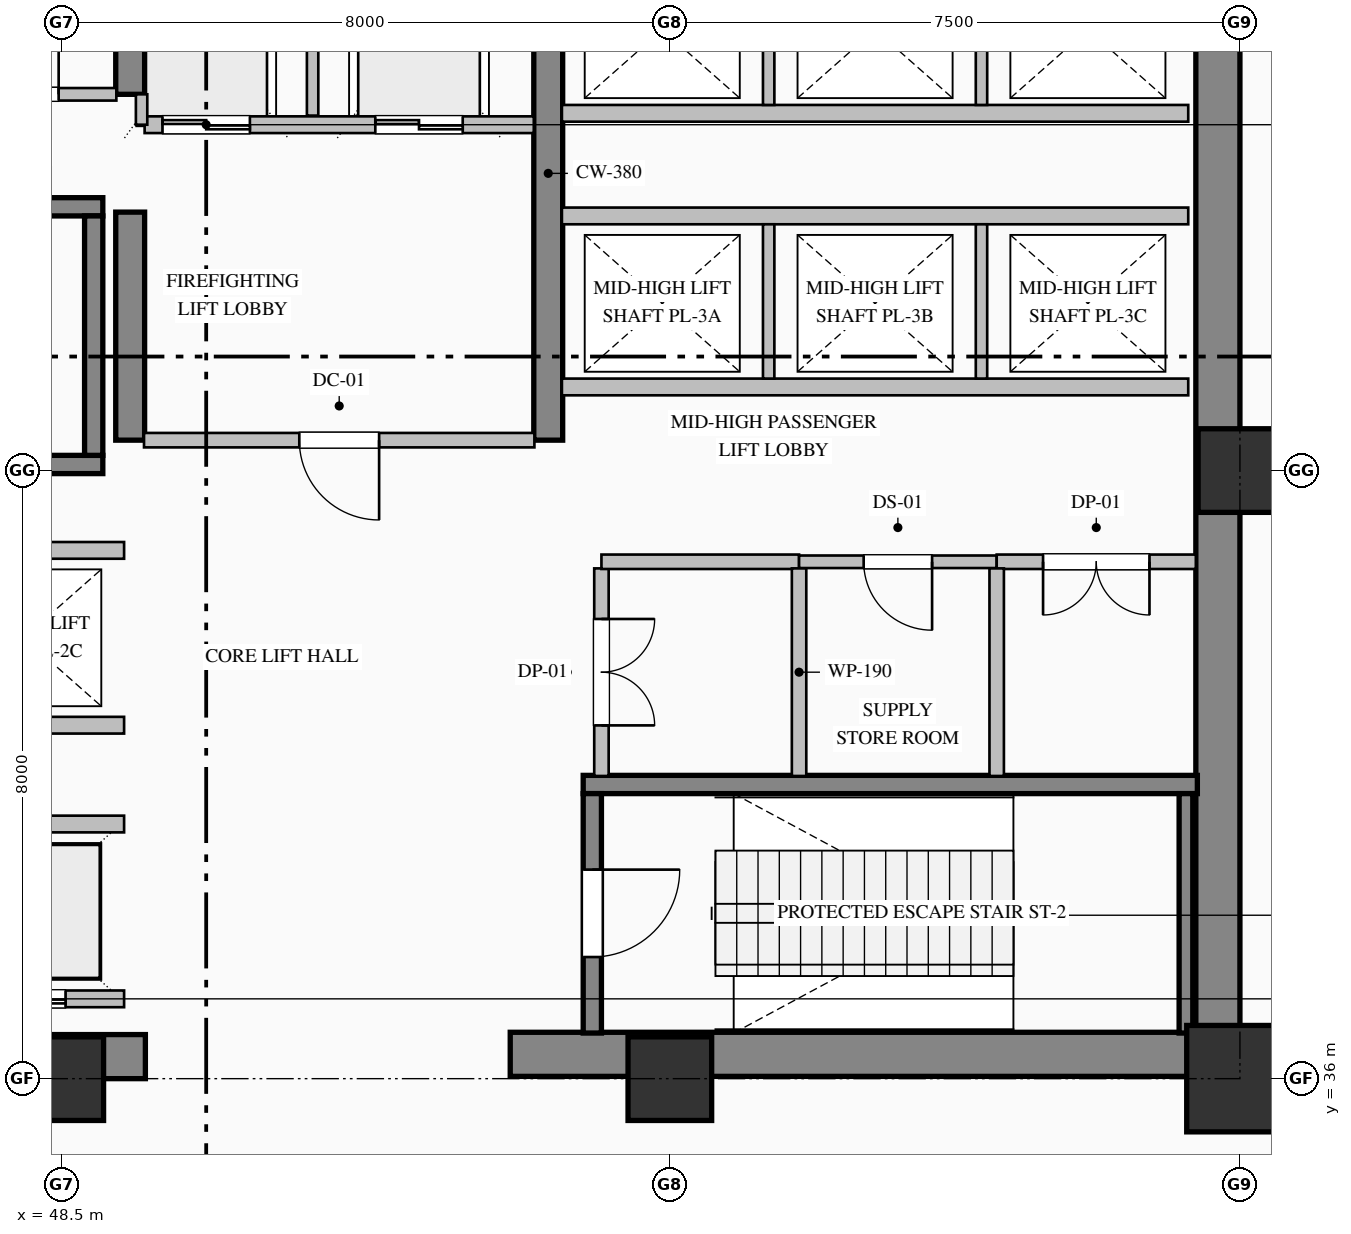
"""IFC4 building model, lengths in metres.
Left out: names, types, materials, properties, quantities, classifications, styles, units other than length and angle.
Written with IfcOpenShell. Run it as: python <this file> out.ifc"""

import sys

from ifc_helpers import new_model, si_unit, direction, frame, frame_2d, origin, origin_2d, place, context, subcontext, project, spatial, rectangle, hollow_rectangle, extrude, element, fill, save


model = new_model("IFC4")
c1 = context("Model", 3, precision=1e-05, world=origin(), true_north=direction((0.0, 1.0)))
c2 = subcontext(c1, "Body", "Model", "MODEL_VIEW")
j1 = project(units=[si_unit("LENGTHUNIT", "METRE"), si_unit("PLANEANGLEUNIT", "RADIAN")], contexts=[c1])
p1 = place(None, origin())
s1 = spatial("IfcSite", under=j1, at=p1, CompositionType="ELEMENT")
p2 = place(p1, origin())
s2 = spatial("IfcBuilding", under=s1, at=p2, CompositionType="ELEMENT")
p3 = place(p2, frame((0.0, 0.0, 6.0)))
s3 = spatial("IfcBuildingStorey", under=s2, at=p3, CompositionType="ELEMENT", Elevation=6.0)
p4 = place(p3, frame((63.71, 36.32, 0.0), z_axis=(0.0, 0.0, 1.0), x_axis=(0.0, 1.0, 0.0)))
e1 = element("IfcWall", 1, at=p4, inside=s3, PredefinedType="SHEAR", context=c2, shape_type="SweptSolid", body=[
    extrude(rectangle(XDim=15.1, YDim=0.58, at=frame_2d((7.55, 0.0))), origin(), (0.0, 0.0, 1.0), 5.12),
])
p5 = place(p3, frame((48.2, 36.29, 0.0), z_axis=(0.0, 0.0, 1.0), x_axis=(1.0, 0.0, 0.0)))
e2 = element("IfcWall", 2, at=p5, inside=s3, PredefinedType="SHEAR", context=c2, shape_type="SweptSolid", body=[
    extrude(rectangle(XDim=1.4, YDim=0.58, at=frame_2d((0.7, 0.0))), origin(), (0.0, 0.0, 1.0), 5.12),
])
p6 = place(p3, frame((54.4, 36.32, 0.0), z_axis=(0.0, 0.0, 1.0), x_axis=(1.0, 0.0, 0.0)))
e3 = element("IfcWall", 3, at=p6, inside=s3, PredefinedType="SHEAR", context=c2, shape_type="SweptSolid", body=[
    extrude(rectangle(XDim=9.6, YDim=0.58, at=frame_2d((4.8, 0.0))), origin(), (0.0, 0.0, 1.0), 5.4),
])
p7 = place(p3, frame((49.4, 44.4, 0.0), z_axis=(0.0, 0.0, 1.0), x_axis=(0.0, 1.0, 0.0)))
e4 = element("IfcWall", 4, at=p7, inside=s3, PredefinedType="SHEAR", context=c2, shape_type="SweptSolid", body=[
    extrude(rectangle(XDim=3.0, YDim=0.38, at=frame_2d((1.5, 0.0))), origin(), (0.0, 0.0, 1.0), 5.12),
])
p8 = place(p3, frame((49.4, 48.95, 0.0), z_axis=(0.0, 0.0, 1.0), x_axis=(0.0, 1.0, 0.0)))
e5 = element("IfcWall", 5, at=p8, inside=s3, PredefinedType="SHEAR", context=c2, shape_type="SweptSolid", body=[
    extrude(rectangle(XDim=2.47, YDim=0.38, at=frame_2d((1.235, 0.0))), origin(), (0.0, 0.0, 1.0), 5.12),
])
p9 = place(p3, frame((54.9, 44.4, 0.0), z_axis=(0.0, 0.0, 1.0), x_axis=(0.0, 1.0, 0.0)))
e6 = element("IfcWall", 6, at=p9, inside=s3, PredefinedType="SHEAR", context=c2, shape_type="SweptSolid", body=[
    extrude(rectangle(XDim=7.02, YDim=0.38, at=frame_2d((3.51, 0.0))), origin(), (0.0, 0.0, 1.0), 5.12),
])
for number, where, z_axis, x_axis in (
    (7, (48.5, 36.0, 0.0), (0.0, 0.0, 1.0), (1.0, 0.0, 0.0)),
    (8, (56.5, 36.0, 0.0), (0.0, 0.0, 1.0), (1.0, 0.0, 0.0)),
):
    element("IfcColumn", number, at=place(p3, frame(where, z_axis=z_axis, x_axis=x_axis)), inside=s3, PredefinedType="COLUMN", context=c2, shape_type="SweptSolid", body=[
        extrude(rectangle(XDim=1.1, YDim=1.1, at=origin_2d()), origin(), (0.0, 0.0, 1.0), 5.4),
    ])
p10 = place(p3, frame((64.0, 36.0, 0.0), z_axis=(0.0, 0.0, 1.0), x_axis=(1.0, 0.0, 0.0)))
e9 = element("IfcColumn", 9, at=p10, inside=s3, PredefinedType="COLUMN", context=c2, shape_type="SweptSolid", body=[
    extrude(hollow_rectangle(XDim=1.4, YDim=1.4, WallThickness=0.05, at=origin_2d()), origin(), (0.0, 0.0, 1.0), 5.4),
])
p11 = place(p3, frame((64.0, 44.0, 0.0), z_axis=(0.0, 0.0, 1.0), x_axis=(1.0, 0.0, 0.0)))
e10 = element("IfcColumn", 10, at=p11, inside=s3, PredefinedType="COLUMN", context=c2, shape_type="SweptSolid", body=[
    extrude(rectangle(XDim=1.1, YDim=1.1, at=origin_2d()), origin(), (0.0, 0.0, 1.0), 5.4),
])
for number, where, z_axis, x_axis in (
    (11, (40.96, 47.47, 0.0), (0.0, 0.0, 1.0), (1.0, 0.0, 0.0)),
    (12, (49.04, 44.08, 0.0), (0.0, 0.0, 1.0), (-1.0, 0.0, 0.0)),
):
    element("IfcWall", number, at=place(p3, frame(where, z_axis=z_axis, x_axis=x_axis)), inside=s3, PredefinedType="SOLIDWALL", context=c2, shape_type="SweptSolid", body=[
        extrude(rectangle(XDim=8.08, YDim=0.24, at=frame_2d((4.04, 0.0))), origin(), (0.0, 0.0, 1.0), 5.4),
    ])
p12 = place(p3, frame((48.92, 44.2, 0.0), z_axis=(0.0, 0.0, 1.0), x_axis=(0.0, 1.0, 0.0)))
e13 = element("IfcWall", 13, at=p12, inside=s3, PredefinedType="SOLIDWALL", context=c2, shape_type="SweptSolid", body=[
    extrude(rectangle(XDim=3.15, YDim=0.24, at=frame_2d((1.575, 0.0))), origin(), (0.0, 0.0, 1.0), 5.4),
])
p13 = place(p3, frame((55.36, 39.87, 0.0), z_axis=(0.0, 0.0, 1.0), x_axis=(1.0, 0.0, 0.0)))
e14 = element("IfcWall", 14, at=p13, inside=s3, PredefinedType="SOLIDWALL", context=c2, shape_type="SweptSolid", body=[
    extrude(rectangle(XDim=8.08, YDim=0.24, at=frame_2d((4.04, 0.0))), origin(), (0.0, 0.0, 1.0), 5.4),
])
p14 = place(p3, frame((55.48, 39.75, 0.0), z_axis=(0.0, 0.0, 1.0), x_axis=(0.0, -1.0, 0.0)))
e15 = element("IfcWall", 15, at=p14, inside=s3, PredefinedType="SOLIDWALL", context=c2, shape_type="SweptSolid", body=[
    extrude(rectangle(XDim=3.15, YDim=0.24, at=frame_2d((1.575, 0.0))), origin(), (0.0, 0.0, 1.0), 5.4),
])
p15 = place(p14, frame((1.0, 0.0, 0.0)))
e16 = element("IfcOpeningElement", 16, at=p15, cuts=e15, PredefinedType="OPENING", context=c2, shape_type="SweptSolid", body=[
    extrude(rectangle(XDim=1.15, YDim=2.2, at=frame_2d((0.575, 1.1))), frame((0.0, 0.13, 0.0), z_axis=(0.0, -1.0, 0.0), x_axis=(1.0, 0.0, 0.0)), (0.0, 0.0, 1.0), 0.26),
])
p16 = place(p3, frame((63.29, 36.6, 0.0), z_axis=(0.0, 0.0, 1.0), x_axis=(0.0, 1.0, 0.0)))
e17 = element("IfcWall", 17, at=p16, inside=s3, PredefinedType="SOLIDWALL", context=c2, shape_type="SweptSolid", body=[
    extrude(rectangle(XDim=3.15, YDim=0.18, at=frame_2d((1.575, 0.0))), origin(), (0.0, 0.0, 1.0), 5.4),
])
p17 = place(p3, frame((54.71, 48.55, 0.0), z_axis=(0.0, 0.0, 1.0), x_axis=(-1.0, 0.0, 0.0)))
e18 = element("IfcWall", 18, at=p17, inside=s3, PredefinedType="PARTITIONING", context=c2, shape_type="SweptSolid", body=[
    extrude(rectangle(XDim=5.12, YDim=0.22, at=frame_2d((2.56, 0.0))), origin(), (0.0, 0.0, 1.0), 5.12),
])
p18 = place(p17, frame((3.735, 0.0, 0.0)))
e19 = element("IfcOpeningElement", 19, at=p18, cuts=e18, PredefinedType="OPENING", context=c2, shape_type="SweptSolid", body=[
    extrude(rectangle(XDim=1.15, YDim=2.2, at=frame_2d((0.575, 1.1))), frame((0.0, 0.12, 0.0), z_axis=(0.0, -1.0, 0.0), x_axis=(1.0, 0.0, 0.0)), (0.0, 0.0, 1.0), 0.24),
])
p19 = place(p17, frame((0.935, 0.0, 0.0)))
e20 = element("IfcOpeningElement", 20, at=p19, cuts=e18, PredefinedType="OPENING", context=c2, shape_type="SweptSolid", body=[
    extrude(rectangle(XDim=1.15, YDim=2.2, at=frame_2d((0.575, 1.1))), frame((0.0, 0.12, 0.0), z_axis=(0.0, -1.0, 0.0), x_axis=(1.0, 0.0, 0.0)), (0.0, 0.0, 1.0), 0.24),
])
p20 = place(p3, frame((51.8, 48.67, 0.0), z_axis=(0.0, 0.0, 1.0), x_axis=(0.0, 1.0, 0.0)))
e21 = element("IfcWall", 21, at=p20, inside=s3, PredefinedType="PARTITIONING", context=c2, shape_type="SweptSolid", body=[
    extrude(rectangle(XDim=2.75, YDim=0.15, at=frame_2d((1.375, 0.0))), origin(), (0.0, 0.0, 1.0), 5.12),
])
p21 = place(p3, frame((49.55, 48.55, 0.0), z_axis=(0.0, 0.0, 1.0), x_axis=(0.0, 1.0, 0.0)))
e22 = element("IfcWall", 22, at=p21, inside=s3, PredefinedType="PARTITIONING", context=c2, shape_type="SweptSolid", body=[
    extrude(rectangle(XDim=0.4, YDim=0.15, at=frame_2d((0.2, 0.0))), origin(), (0.0, 0.0, 1.0), 5.12),
])
p22 = place(p3, frame((49.32, 37.05, 0.0), z_axis=(0.0, 0.0, 1.0), x_axis=(-1.0, 0.0, 0.0)))
e23 = element("IfcWall", 23, at=p22, inside=s3, PredefinedType="PARTITIONING", context=c2, shape_type="SweptSolid", body=[
    extrude(rectangle(XDim=8.24, YDim=0.22, at=frame_2d((4.12, 0.0))), origin(), (0.0, 0.0, 1.0), 5.12),
])
p23 = place(p22, frame((6.37, 0.0, 0.0)))
e24 = element("IfcOpeningElement", 24, at=p23, cuts=e23, PredefinedType="OPENING", context=c2, shape_type="SweptSolid", body=[
    extrude(rectangle(XDim=1.1, YDim=2.2, at=frame_2d((0.55, 1.1))), frame((0.0, 0.12, 0.0), z_axis=(0.0, -1.0, 0.0), x_axis=(1.0, 0.0, 0.0)), (0.0, 0.0, 1.0), 0.24),
])
p24 = place(p22, frame((3.57, 0.0, 0.0)))
e25 = element("IfcOpeningElement", 25, at=p24, cuts=e23, PredefinedType="OPENING", context=c2, shape_type="SweptSolid", body=[
    extrude(rectangle(XDim=1.1, YDim=2.2, at=frame_2d((0.55, 1.1))), frame((0.0, 0.12, 0.0), z_axis=(0.0, -1.0, 0.0), x_axis=(1.0, 0.0, 0.0)), (0.0, 0.0, 1.0), 0.24),
])
p25 = place(p22, frame((0.77, 0.0, 0.0)))
e26 = element("IfcOpeningElement", 26, at=p25, cuts=e23, PredefinedType="OPENING", context=c2, shape_type="SweptSolid", body=[
    extrude(rectangle(XDim=1.1, YDim=2.2, at=frame_2d((0.55, 1.1))), frame((0.0, 0.12, 0.0), z_axis=(0.0, -1.0, 0.0), x_axis=(1.0, 0.0, 0.0)), (0.0, 0.0, 1.0), 0.24),
])
for number, where, z_axis, x_axis in (
    (27, (41.08, 39.35, 0.0), (0.0, 0.0, 1.0), (1.0, 0.0, 0.0)),
    (28, (49.32, 40.65, 0.0), (0.0, 0.0, 1.0), (-1.0, 0.0, 0.0)),
    (29, (41.08, 42.95, 0.0), (0.0, 0.0, 1.0), (1.0, 0.0, 0.0)),
    (30, (63.32, 45.1, 0.0), (0.0, 0.0, 1.0), (-1.0, 0.0, 0.0)),
    (31, (55.08, 47.35, 0.0), (0.0, 0.0, 1.0), (1.0, 0.0, 0.0)),
):
    element("IfcWall", number, at=place(p3, frame(where, z_axis=z_axis, x_axis=x_axis)), inside=s3, PredefinedType="PARTITIONING", context=c2, shape_type="SweptSolid", body=[
        extrude(rectangle(XDim=8.24, YDim=0.22, at=frame_2d((4.12, 0.0))), origin(), (0.0, 0.0, 1.0), 5.12),
    ])
for number, where, z_axis, x_axis in (
    (32, (57.8, 45.21, 0.0), (0.0, 0.0, 1.0), (0.0, 1.0, 0.0)),
    (33, (60.6, 45.21, 0.0), (0.0, 0.0, 1.0), (0.0, 1.0, 0.0)),
):
    element("IfcWall", number, at=place(p3, frame(where, z_axis=z_axis, x_axis=x_axis)), inside=s3, PredefinedType="PARTITIONING", context=c2, shape_type="SweptSolid", body=[
        extrude(rectangle(XDim=2.03, YDim=0.15, at=frame_2d((1.015, 0.0))), origin(), (0.0, 0.0, 1.0), 5.12),
    ])
p26 = place(p3, frame((63.32, 48.7, 0.0), z_axis=(0.0, 0.0, 1.0), x_axis=(-1.0, 0.0, 0.0)))
e34 = element("IfcWall", 34, at=p26, inside=s3, PredefinedType="PARTITIONING", context=c2, shape_type="SweptSolid", body=[
    extrude(rectangle(XDim=8.24, YDim=0.22, at=frame_2d((4.12, 0.0))), origin(), (0.0, 0.0, 1.0), 5.12),
])
for number, where, z_axis, x_axis in (
    (35, (57.8, 48.81, 0.0), (0.0, 0.0, 1.0), (0.0, 1.0, 0.0)),
    (36, (60.6, 48.81, 0.0), (0.0, 0.0, 1.0), (0.0, 1.0, 0.0)),
):
    element("IfcWall", number, at=place(p3, frame(where, z_axis=z_axis, x_axis=x_axis)), inside=s3, PredefinedType="PARTITIONING", context=c2, shape_type="SweptSolid", body=[
        extrude(rectangle(XDim=2.61, YDim=0.15, at=frame_2d((1.305, 0.0))), origin(), (0.0, 0.0, 1.0), 5.12),
    ])
p27 = place(p3, frame((46.8, 48.95, 0.0), z_axis=(0.0, 0.0, 1.0), x_axis=(1.0, 0.0, 0.0)))
e37 = element("IfcWall", 37, at=p27, inside=s3, PredefinedType="PARTITIONING", context=c2, shape_type="SweptSolid", body=[
    extrude(rectangle(XDim=2.418, YDim=0.165, at=frame_2d((1.209, 0.0))), origin(), (0.0, 0.0, 1.0), 5.12),
])
p28 = place(p27, frame((0.759, 0.0, 0.0)))
e38 = element("IfcOpeningElement", 38, at=p28, cuts=e37, PredefinedType="OPENING", context=c2, shape_type="SweptSolid", body=[
    extrude(rectangle(XDim=0.9, YDim=2.15, at=frame_2d((0.45, 1.075))), frame((0.0, 0.093, 0.0), z_axis=(0.0, -1.0, 0.0), x_axis=(1.0, 0.0, 0.0)), (0.0, 0.0, 1.0), 0.185),
])
p29 = place(p3, frame((54.718, 44.4, 0.0), z_axis=(0.0, 0.0, 1.0), x_axis=(-1.0, 0.0, 0.0)))
e39 = element("IfcWall", 39, at=p29, inside=s3, PredefinedType="PARTITIONING", context=c2, shape_type="SweptSolid", body=[
    extrude(rectangle(XDim=5.136, YDim=0.19, at=frame_2d((2.568, 0.0))), origin(), (0.0, 0.0, 1.0), 5.12),
])
p30 = place(p29, frame((2.043, 0.0, 0.0)))
e40 = element("IfcOpeningElement", 40, at=p30, cuts=e39, PredefinedType="OPENING", context=c2, shape_type="SweptSolid", body=[
    extrude(rectangle(XDim=1.05, YDim=2.15, at=frame_2d((0.525, 1.075))), frame((0.0, 0.105, 0.0), z_axis=(0.0, -1.0, 0.0), x_axis=(1.0, 0.0, 0.0)), (0.0, 0.0, 1.0), 0.21),
])
p31 = place(p3, frame((55.6, 42.713, 0.0), z_axis=(0.0, 0.0, 1.0), x_axis=(0.0, -1.0, 0.0)))
e41 = element("IfcWall", 41, at=p31, inside=s3, PredefinedType="PARTITIONING", context=c2, shape_type="SweptSolid", body=[
    extrude(rectangle(XDim=2.731, YDim=0.19, at=frame_2d((1.365, 0.0))), origin(), (0.0, 0.0, 1.0), 5.12),
])
p32 = place(p31, frame((0.666, 0.0, 0.0)))
e42 = element("IfcOpeningElement", 42, at=p32, cuts=e41, PredefinedType="OPENING", context=c2, shape_type="SweptSolid", body=[
    extrude(rectangle(XDim=1.4, YDim=2.25, at=frame_2d((0.7, 1.125))), frame((0.0, 0.105, 0.0), z_axis=(0.0, -1.0, 0.0), x_axis=(1.0, 0.0, 0.0)), (0.0, 0.0, 1.0), 0.21),
])
p33 = place(p3, frame((58.2, 42.8, 0.0), z_axis=(0.0, 0.0, 1.0), x_axis=(-1.0, 0.0, 0.0)))
e43 = element("IfcWall", 43, at=p33, inside=s3, PredefinedType="PARTITIONING", context=c2, shape_type="SweptSolid", body=[
    extrude(rectangle(XDim=2.6, YDim=0.19, at=frame_2d((1.3, 0.0))), origin(), (0.0, 0.0, 1.0), 5.12),
])
p34 = place(p3, frame((60.8, 42.8, 0.0), z_axis=(0.0, 0.0, 1.0), x_axis=(-1.0, 0.0, 0.0)))
e44 = element("IfcWall", 44, at=p34, inside=s3, PredefinedType="PARTITIONING", context=c2, shape_type="SweptSolid", body=[
    extrude(rectangle(XDim=2.6, YDim=0.165, at=frame_2d((1.3, 0.0))), origin(), (0.0, 0.0, 1.0), 5.12),
])
p35 = place(p34, frame((0.85, 0.0, 0.0)))
e45 = element("IfcOpeningElement", 45, at=p35, cuts=e44, PredefinedType="OPENING", context=c2, shape_type="SweptSolid", body=[
    extrude(rectangle(XDim=0.9, YDim=2.15, at=frame_2d((0.45, 1.075))), frame((0.0, 0.093, 0.0), z_axis=(0.0, -1.0, 0.0), x_axis=(1.0, 0.0, 0.0)), (0.0, 0.0, 1.0), 0.185),
])
p36 = place(p3, frame((63.42, 42.8, 0.0), z_axis=(0.0, 0.0, 1.0), x_axis=(-1.0, 0.0, 0.0)))
e46 = element("IfcWall", 46, at=p36, inside=s3, PredefinedType="PARTITIONING", context=c2, shape_type="SweptSolid", body=[
    extrude(rectangle(XDim=2.62, YDim=0.19, at=frame_2d((1.31, 0.0))), origin(), (0.0, 0.0, 1.0), 5.12),
])
p37 = place(p36, frame((0.61, 0.0, 0.0)))
e47 = element("IfcOpeningElement", 47, at=p37, cuts=e46, PredefinedType="OPENING", context=c2, shape_type="SweptSolid", body=[
    extrude(rectangle(XDim=1.4, YDim=2.25, at=frame_2d((0.7, 1.125))), frame((0.0, 0.105, 0.0), z_axis=(0.0, -1.0, 0.0), x_axis=(1.0, 0.0, 0.0)), (0.0, 0.0, 1.0), 0.21),
])
for number, where, z_axis, x_axis in (
    (48, (58.2, 42.713, 0.0), (0.0, 0.0, 1.0), (0.0, -1.0, 0.0)),
    (49, (60.8, 42.713, 0.0), (0.0, 0.0, 1.0), (0.0, -1.0, 0.0)),
):
    element("IfcWall", number, at=place(p3, frame(where, z_axis=z_axis, x_axis=x_axis)), inside=s3, PredefinedType="PARTITIONING", context=c2, shape_type="SweptSolid", body=[
        extrude(rectangle(XDim=2.731, YDim=0.19, at=frame_2d((1.365, 0.0))), origin(), (0.0, 0.0, 1.0), 5.12),
    ])
p38 = place(p15, origin())
e50 = element("IfcDoor", 50, at=p38, inside=s3, OperationType="SINGLE_SWING_LEFT", PredefinedType="DOOR", context=c2, shape_type="SweptSolid", body=[
    extrude(rectangle(XDim=1.15, YDim=2.2, at=frame_2d((0.575, 1.1))), frame((0.0, 0.025, 0.0), z_axis=(0.0, -1.0, 0.0), x_axis=(1.0, 0.0, 0.0)), (0.0, 0.0, 1.0), 0.05),
])
fill(e16, e50)
p39 = place(p18, origin())
e51 = element("IfcDoor", 51, at=p39, inside=s3, OperationType="DOUBLE_DOOR_SLIDING", PredefinedType="DOOR", context=c2, shape_type="SweptSolid", body=[
    extrude(rectangle(XDim=1.15, YDim=2.2, at=frame_2d((0.575, 1.1))), frame((0.0, 0.025, 0.0), z_axis=(0.0, -1.0, 0.0), x_axis=(1.0, 0.0, 0.0)), (0.0, 0.0, 1.0), 0.05),
])
fill(e19, e51)
p40 = place(p19, origin())
e52 = element("IfcDoor", 52, at=p40, inside=s3, OperationType="DOUBLE_DOOR_SLIDING", PredefinedType="DOOR", context=c2, shape_type="SweptSolid", body=[
    extrude(rectangle(XDim=1.15, YDim=2.2, at=frame_2d((0.575, 1.1))), frame((0.0, 0.025, 0.0), z_axis=(0.0, -1.0, 0.0), x_axis=(1.0, 0.0, 0.0)), (0.0, 0.0, 1.0), 0.05),
])
fill(e20, e52)
p41 = place(p25, origin())
e53 = element("IfcDoor", 53, at=p41, inside=s3, OperationType="DOUBLE_DOOR_SLIDING", PredefinedType="DOOR", context=c2, shape_type="SweptSolid", body=[
    extrude(rectangle(XDim=1.1, YDim=2.2, at=frame_2d((0.55, 1.1))), frame((0.0, 0.025, 0.0), z_axis=(0.0, -1.0, 0.0), x_axis=(1.0, 0.0, 0.0)), (0.0, 0.0, 1.0), 0.05),
])
fill(e26, e53)
p42 = place(p30, origin())
e54 = element("IfcDoor", 54, at=p42, inside=s3, OperationType="SINGLE_SWING_LEFT", PredefinedType="DOOR", context=c2, shape_type="SweptSolid", body=[
    extrude(rectangle(XDim=1.05, YDim=2.15, at=frame_2d((0.525, 1.075))), frame((0.0, 0.025, 0.0), z_axis=(0.0, -1.0, 0.0), x_axis=(1.0, 0.0, 0.0)), (0.0, 0.0, 1.0), 0.05),
])
fill(e40, e54)
p43 = place(p28, origin())
e55 = element("IfcDoor", 55, at=p43, inside=s3, OperationType="SINGLE_SWING_RIGHT", PredefinedType="DOOR", context=c2, shape_type="SweptSolid", body=[
    extrude(rectangle(XDim=0.9, YDim=2.15, at=frame_2d((0.45, 1.075))), frame((0.0, 0.025, 0.0), z_axis=(0.0, -1.0, 0.0), x_axis=(1.0, 0.0, 0.0)), (0.0, 0.0, 1.0), 0.05),
])
fill(e38, e55)
p44 = place(p32, origin())
e56 = element("IfcDoor", 56, at=p44, inside=s3, OperationType="DOUBLE_DOOR_SINGLE_SWING", PredefinedType="DOOR", context=c2, shape_type="SweptSolid", body=[
    extrude(rectangle(XDim=1.4, YDim=2.25, at=frame_2d((0.7, 1.125))), frame((0.0, 0.025, 0.0), z_axis=(0.0, -1.0, 0.0), x_axis=(1.0, 0.0, 0.0)), (0.0, 0.0, 1.0), 0.05),
])
fill(e42, e56)
p45 = place(p35, origin())
e57 = element("IfcDoor", 57, at=p45, inside=s3, OperationType="SINGLE_SWING_LEFT", PredefinedType="DOOR", context=c2, shape_type="SweptSolid", body=[
    extrude(rectangle(XDim=0.9, YDim=2.15, at=frame_2d((0.45, 1.075))), frame((0.0, 0.025, 0.0), z_axis=(0.0, -1.0, 0.0), x_axis=(1.0, 0.0, 0.0)), (0.0, 0.0, 1.0), 0.05),
])
fill(e45, e57)
p46 = place(p37, origin())
e58 = element("IfcDoor", 58, at=p46, inside=s3, OperationType="DOUBLE_DOOR_SINGLE_SWING", PredefinedType="DOOR", context=c2, shape_type="SweptSolid", body=[
    extrude(rectangle(XDim=1.4, YDim=2.25, at=frame_2d((0.7, 1.125))), frame((0.0, 0.025, 0.0), z_axis=(0.0, -1.0, 0.0), x_axis=(1.0, 0.0, 0.0)), (0.0, 0.0, 1.0), 0.05),
])
fill(e47, e58)
save(model, sys.argv[1])
